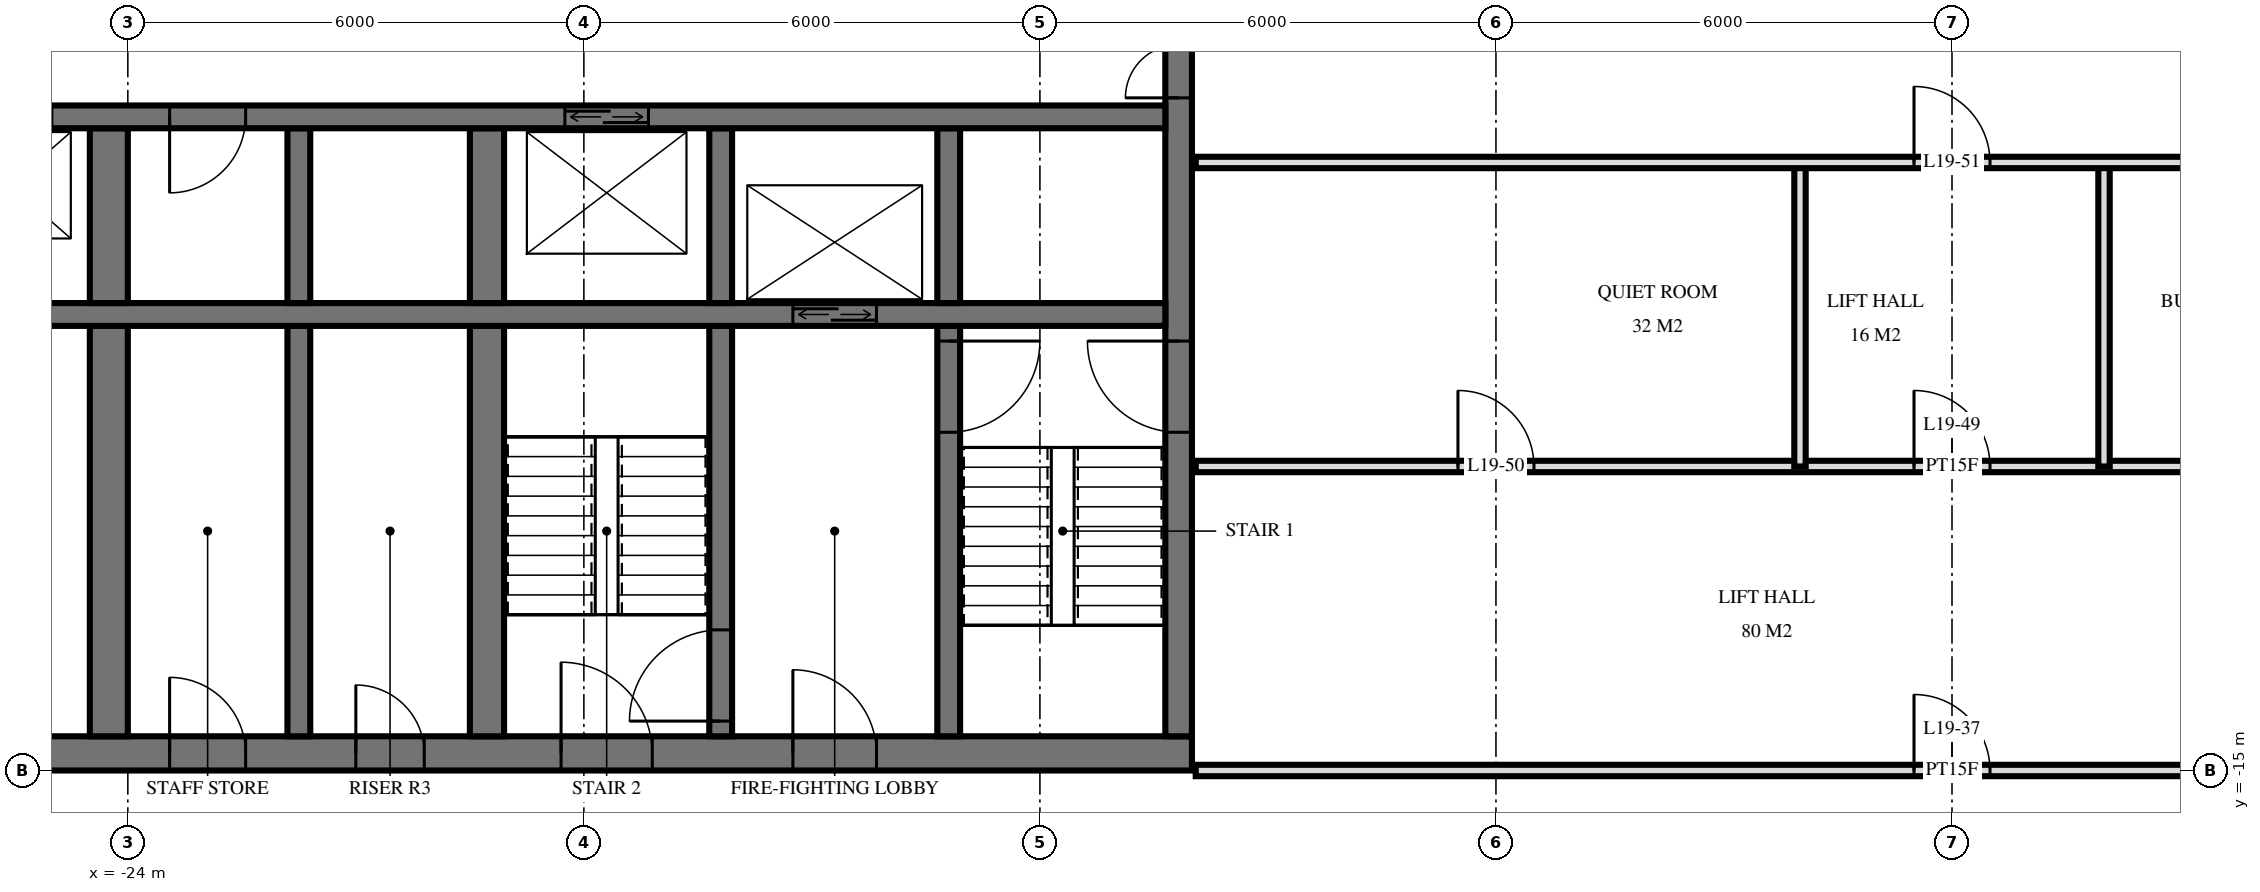
"""IFC4 building model, lengths in metres.
Left out: names, types, materials, properties, quantities, classifications, styles, units other than length and angle.
Written with IfcOpenShell. Run it as: python <this file> out.ifc"""

import sys

from ifc_helpers import new_model, si_unit, direction, frame, frame_2d, origin, place, context, subcontext, project, spatial, rectangle, extrude, element, fill, save


model = new_model("IFC4")
c1 = context("Model", 3, precision=1e-05, world=origin(), true_north=direction((0.0, 1.0)))
c2 = subcontext(c1, "Body", "Model", "MODEL_VIEW")
j1 = project(units=[si_unit("LENGTHUNIT", "METRE"), si_unit("PLANEANGLEUNIT", "RADIAN")], contexts=[c1])
p1 = place(None, origin())
s1 = spatial("IfcSite", under=j1, at=p1, CompositionType="ELEMENT")
p2 = place(p1, origin())
s2 = spatial("IfcBuilding", under=s1, at=p2, CompositionType="ELEMENT")
p3 = place(p2, frame((0.0, 0.0, 78.0)))
s3 = spatial("IfcBuildingStorey", under=s2, at=p3, CompositionType="ELEMENT", Elevation=78.0)
p4 = place(p3, frame((-29.5, -14.775, 0.0), z_axis=(0.0, 0.0, 1.0), x_axis=(1.0, 0.0, 0.0)))
e1 = element("IfcWall", 1, at=p4, inside=s3, PredefinedType="SHEAR", context=c2, shape_type="SweptSolid", body=[
    extrude(rectangle(XDim=19.5, YDim=0.45, at=frame_2d((9.75, 0.0))), origin(), (0.0, 0.0, 1.0), 3.6),
])
p5 = place(p4, frame((11.2, 0.0, 0.0)))
e2 = element("IfcOpeningElement", 2, at=p5, cuts=e1, PredefinedType="OPENING", context=c2, shape_type="SweptSolid", body=[
    extrude(rectangle(XDim=1.2, YDim=2.1, at=frame_2d((0.6, 1.05))), frame((0.0, 0.235, 0.0), z_axis=(0.0, -1.0, 0.0), x_axis=(1.0, 0.0, 0.0)), (0.0, 0.0, 1.0), 0.47),
])
p6 = place(p4, frame((14.25, 0.0, 0.0)))
e3 = element("IfcOpeningElement", 3, at=p6, cuts=e1, PredefinedType="OPENING", context=c2, shape_type="SweptSolid", body=[
    extrude(rectangle(XDim=1.1, YDim=2.1, at=frame_2d((0.55, 1.05))), frame((0.0, 0.235, 0.0), z_axis=(0.0, -1.0, 0.0), x_axis=(1.0, 0.0, 0.0)), (0.0, 0.0, 1.0), 0.47),
])
p7 = place(p4, frame((8.5, 0.0, 0.0)))
e4 = element("IfcOpeningElement", 4, at=p7, cuts=e1, PredefinedType="OPENING", context=c2, shape_type="SweptSolid", body=[
    extrude(rectangle(XDim=0.9, YDim=2.1, at=frame_2d((0.45, 1.05))), frame((0.0, 0.235, 0.0), z_axis=(0.0, -1.0, 0.0), x_axis=(1.0, 0.0, 0.0)), (0.0, 0.0, 1.0), 0.47),
])
p8 = place(p4, frame((6.05, 0.0, 0.0)))
e5 = element("IfcOpeningElement", 5, at=p8, cuts=e1, PredefinedType="OPENING", context=c2, shape_type="SweptSolid", body=[
    extrude(rectangle(XDim=1.0, YDim=2.1, at=frame_2d((0.5, 1.05))), frame((0.0, 0.235, 0.0), z_axis=(0.0, -1.0, 0.0), x_axis=(1.0, 0.0, 0.0)), (0.0, 0.0, 1.0), 0.47),
])
p9 = place(p4, frame((2.988, 0.0, 0.0)))
e6 = element("IfcOpeningElement", 6, at=p9, cuts=e1, PredefinedType="OPENING", context=c2, shape_type="SweptSolid", body=[
    extrude(rectangle(XDim=1.0, YDim=2.1, at=frame_2d((0.5, 1.05))), frame((0.0, 0.235, 0.0), z_axis=(0.0, -1.0, 0.0), x_axis=(1.0, 0.0, 0.0)), (0.0, 0.0, 1.0), 0.47),
])
p10 = place(p4, frame((0.663, 0.0, 0.0)))
e7 = element("IfcOpeningElement", 7, at=p10, cuts=e1, PredefinedType="OPENING", context=c2, shape_type="SweptSolid", body=[
    extrude(rectangle(XDim=1.0, YDim=2.1, at=frame_2d((0.5, 1.05))), frame((0.0, 0.235, 0.0), z_axis=(0.0, -1.0, 0.0), x_axis=(1.0, 0.0, 0.0)), (0.0, 0.0, 1.0), 0.47),
])
p11 = place(p3, frame((-10.175, -14.55, 0.0), z_axis=(0.0, 0.0, 1.0), x_axis=(0.0, 1.0, 0.0)))
e8 = element("IfcWall", 8, at=p11, inside=s3, PredefinedType="SHEAR", context=c2, shape_type="SweptSolid", body=[
    extrude(rectangle(XDim=14.1, YDim=0.35, at=frame_2d((7.05, 0.0))), origin(), (0.0, 0.0, 1.0), 3.6),
])
p12 = place(p11, frame((8.4, 0.0, 0.0)))
e9 = element("IfcOpeningElement", 9, at=p12, cuts=e8, PredefinedType="OPENING", context=c2, shape_type="SweptSolid", body=[
    extrude(rectangle(XDim=1.4, YDim=2.4, at=frame_2d((0.7, 1.2))), frame((0.0, 0.185, 0.0), z_axis=(0.0, -1.0, 0.0), x_axis=(1.0, 0.0, 0.0)), (0.0, 0.0, 1.0), 0.37),
])
p13 = place(p11, frame((10.0, 0.0, 0.0)))
e10 = element("IfcOpeningElement", 10, at=p13, cuts=e8, PredefinedType="OPENING", context=c2, shape_type="SweptSolid", body=[
    extrude(rectangle(XDim=1.4, YDim=2.4, at=frame_2d((0.7, 1.2))), frame((0.0, 0.185, 0.0), z_axis=(0.0, -1.0, 0.0), x_axis=(1.0, 0.0, 0.0)), (0.0, 0.0, 1.0), 0.37),
])
p14 = place(p11, frame((4.0, 0.0, 0.0)))
e11 = element("IfcOpeningElement", 11, at=p14, cuts=e8, PredefinedType="OPENING", context=c2, shape_type="SweptSolid", body=[
    extrude(rectangle(XDim=1.2, YDim=2.1, at=frame_2d((0.6, 1.05))), frame((0.0, 0.185, 0.0), z_axis=(0.0, -1.0, 0.0), x_axis=(1.0, 0.0, 0.0)), (0.0, 0.0, 1.0), 0.37),
])
p15 = place(p3, frame((-29.05, -6.4, 0.0), z_axis=(0.0, 0.0, 1.0), x_axis=(1.0, 0.0, 0.0)))
e12 = element("IfcWall", 12, at=p15, inside=s3, PredefinedType="SHEAR", context=c2, shape_type="SweptSolid", body=[
    extrude(rectangle(XDim=18.7, YDim=0.3, at=frame_2d((9.35, 0.0))), origin(), (0.0, 0.0, 1.0), 3.6),
])
p16 = place(p15, frame((2.95, 0.0, 0.0)))
e13 = element("IfcOpeningElement", 13, at=p16, cuts=e12, PredefinedType="OPENING", context=c2, shape_type="SweptSolid", body=[
    extrude(rectangle(XDim=1.1, YDim=2.1, at=frame_2d((0.55, 1.05))), frame((0.0, 0.16, 0.0), z_axis=(0.0, -1.0, 0.0), x_axis=(1.0, 0.0, 0.0)), (0.0, 0.0, 1.0), 0.32),
])
p17 = place(p15, frame((0.55, 0.0, 0.0)))
e14 = element("IfcOpeningElement", 14, at=p17, cuts=e12, PredefinedType="OPENING", context=c2, shape_type="SweptSolid", body=[
    extrude(rectangle(XDim=1.1, YDim=2.1, at=frame_2d((0.55, 1.05))), frame((0.0, 0.16, 0.0), z_axis=(0.0, -1.0, 0.0), x_axis=(1.0, 0.0, 0.0)), (0.0, 0.0, 1.0), 0.32),
])
p18 = place(p15, frame((10.8, 0.0, 0.0)))
e15 = element("IfcOpeningElement", 15, at=p18, cuts=e12, PredefinedType="OPENING", context=c2, shape_type="SweptSolid", body=[
    extrude(rectangle(XDim=1.1, YDim=2.1, at=frame_2d((0.55, 1.05))), frame((0.0, 0.16, 0.0), z_axis=(0.0, -1.0, 0.0), x_axis=(1.0, 0.0, 0.0)), (0.0, 0.0, 1.0), 0.32),
])
p19 = place(p15, frame((5.6, 0.0, 0.0)))
e16 = element("IfcOpeningElement", 16, at=p19, cuts=e12, PredefinedType="OPENING", context=c2, shape_type="SweptSolid", body=[
    extrude(rectangle(XDim=1.0, YDim=2.1, at=frame_2d((0.5, 1.05))), frame((0.0, 0.16, 0.0), z_axis=(0.0, -1.0, 0.0), x_axis=(1.0, 0.0, 0.0)), (0.0, 0.0, 1.0), 0.32),
])
p20 = place(p3, frame((-29.05, -9.0, 0.0), z_axis=(0.0, 0.0, 1.0), x_axis=(1.0, 0.0, 0.0)))
e17 = element("IfcWall", 17, at=p20, inside=s3, PredefinedType="SHEAR", context=c2, shape_type="SweptSolid", body=[
    extrude(rectangle(XDim=18.7, YDim=0.3, at=frame_2d((9.35, 0.0))), origin(), (0.0, 0.0, 1.0), 3.6),
])
p21 = place(p20, frame((13.8, 0.0, 0.0)))
e18 = element("IfcOpeningElement", 18, at=p21, cuts=e17, PredefinedType="OPENING", context=c2, shape_type="SweptSolid", body=[
    extrude(rectangle(XDim=1.1, YDim=2.1, at=frame_2d((0.55, 1.05))), frame((0.0, 0.16, 0.0), z_axis=(0.0, -1.0, 0.0), x_axis=(1.0, 0.0, 0.0)), (0.0, 0.0, 1.0), 0.32),
])
p22 = place(p3, frame((-13.2, -8.85, 0.0), z_axis=(0.0, 0.0, 1.0), x_axis=(0.0, 1.0, 0.0)))
e19 = element("IfcWall", 19, at=p22, inside=s3, PredefinedType="SHEAR", context=c2, shape_type="SweptSolid", body=[
    extrude(rectangle(XDim=2.3, YDim=0.3, at=frame_2d((1.15, 0.0))), origin(), (0.0, 0.0, 1.0), 3.6),
])
p23 = place(p3, frame((-13.2, -14.55, 0.0), z_axis=(0.0, 0.0, 1.0), x_axis=(0.0, 1.0, 0.0)))
e20 = element("IfcWall", 20, at=p23, inside=s3, PredefinedType="SHEAR", context=c2, shape_type="SweptSolid", body=[
    extrude(rectangle(XDim=5.4, YDim=0.3, at=frame_2d((2.7, 0.0))), origin(), (0.0, 0.0, 1.0), 3.6),
])
p24 = place(p23, frame((4.0, 0.0, 0.0)))
e21 = element("IfcOpeningElement", 21, at=p24, cuts=e20, PredefinedType="OPENING", context=c2, shape_type="SweptSolid", body=[
    extrude(rectangle(XDim=1.2, YDim=2.1, at=frame_2d((0.6, 1.05))), frame((0.0, 0.16, 0.0), z_axis=(0.0, -1.0, 0.0), x_axis=(1.0, 0.0, 0.0)), (0.0, 0.0, 1.0), 0.32),
])
p25 = place(p3, frame((-16.2, -8.85, 0.0), z_axis=(0.0, 0.0, 1.0), x_axis=(0.0, 1.0, 0.0)))
e22 = element("IfcWall", 22, at=p25, inside=s3, PredefinedType="SHEAR", context=c2, shape_type="SweptSolid", body=[
    extrude(rectangle(XDim=2.3, YDim=0.3, at=frame_2d((1.15, 0.0))), origin(), (0.0, 0.0, 1.0), 3.6),
])
p26 = place(p3, frame((-16.2, -14.55, 0.0), z_axis=(0.0, 0.0, 1.0), x_axis=(0.0, 1.0, 0.0)))
e23 = element("IfcWall", 23, at=p26, inside=s3, PredefinedType="SHEAR", context=c2, shape_type="SweptSolid", body=[
    extrude(rectangle(XDim=5.4, YDim=0.3, at=frame_2d((2.7, 0.0))), origin(), (0.0, 0.0, 1.0), 3.6),
])
p27 = place(p26, frame((0.2, 0.0, 0.0)))
e24 = element("IfcOpeningElement", 24, at=p27, cuts=e23, PredefinedType="OPENING", context=c2, shape_type="SweptSolid", body=[
    extrude(rectangle(XDim=1.2, YDim=2.1, at=frame_2d((0.6, 1.05))), frame((0.0, 0.16, 0.0), z_axis=(0.0, -1.0, 0.0), x_axis=(1.0, 0.0, 0.0)), (0.0, 0.0, 1.0), 0.32),
])
p28 = place(p3, frame((-19.275, -8.85, 0.0), z_axis=(0.0, 0.0, 1.0), x_axis=(0.0, 1.0, 0.0)))
e25 = element("IfcWall", 25, at=p28, inside=s3, PredefinedType="SHEAR", context=c2, shape_type="SweptSolid", body=[
    extrude(rectangle(XDim=2.3, YDim=0.45, at=frame_2d((1.15, 0.0))), origin(), (0.0, 0.0, 1.0), 3.6),
])
p29 = place(p3, frame((-19.275, -14.55, 0.0), z_axis=(0.0, 0.0, 1.0), x_axis=(0.0, 1.0, 0.0)))
e26 = element("IfcWall", 26, at=p29, inside=s3, PredefinedType="SHEAR", context=c2, shape_type="SweptSolid", body=[
    extrude(rectangle(XDim=5.4, YDim=0.45, at=frame_2d((2.7, 0.0))), origin(), (0.0, 0.0, 1.0), 3.6),
])
p30 = place(p3, frame((-21.75, -8.85, 0.0), z_axis=(0.0, 0.0, 1.0), x_axis=(0.0, 1.0, 0.0)))
e27 = element("IfcWall", 27, at=p30, inside=s3, PredefinedType="SHEAR", context=c2, shape_type="SweptSolid", body=[
    extrude(rectangle(XDim=2.3, YDim=0.3, at=frame_2d((1.15, 0.0))), origin(), (0.0, 0.0, 1.0), 3.6),
])
p31 = place(p3, frame((-21.75, -14.55, 0.0), z_axis=(0.0, 0.0, 1.0), x_axis=(0.0, 1.0, 0.0)))
e28 = element("IfcWall", 28, at=p31, inside=s3, PredefinedType="SHEAR", context=c2, shape_type="SweptSolid", body=[
    extrude(rectangle(XDim=5.4, YDim=0.3, at=frame_2d((2.7, 0.0))), origin(), (0.0, 0.0, 1.0), 3.6),
])
p32 = place(p3, frame((-24.25, -8.85, 0.0), z_axis=(0.0, 0.0, 1.0), x_axis=(0.0, 1.0, 0.0)))
e29 = element("IfcWall", 29, at=p32, inside=s3, PredefinedType="SHEAR", context=c2, shape_type="SweptSolid", body=[
    extrude(rectangle(XDim=2.3, YDim=0.5, at=frame_2d((1.15, 0.0))), origin(), (0.0, 0.0, 1.0), 3.6),
])
p33 = place(p3, frame((-24.25, -14.55, 0.0), z_axis=(0.0, 0.0, 1.0), x_axis=(0.0, 1.0, 0.0)))
e30 = element("IfcWall", 30, at=p33, inside=s3, PredefinedType="SHEAR", context=c2, shape_type="SweptSolid", body=[
    extrude(rectangle(XDim=5.4, YDim=0.5, at=frame_2d((2.7, 0.0))), origin(), (0.0, 0.0, 1.0), 3.6),
])
for number, where, z_axis, x_axis in (
    (31, (2.0, -11.0, 0.0), (0.0, 0.0, 1.0), (0.0, 1.0, 0.0)),
    (32, (-2.0, -11.0, 0.0), (0.0, 0.0, 1.0), (0.0, 1.0, 0.0)),
):
    element("IfcWall", number, at=place(p3, frame(where, z_axis=z_axis, x_axis=x_axis)), inside=s3, PredefinedType="PARTITIONING", context=c2, shape_type="SweptSolid", body=[
        extrude(rectangle(XDim=4.0, YDim=0.15, at=frame_2d((2.0, 0.0))), origin(), (0.0, 0.0, 1.0), 3.32),
    ])
p34 = place(p3, frame((-9.95, -15.0, 0.0), z_axis=(0.0, 0.0, 1.0), x_axis=(1.0, 0.0, 0.0)))
e33 = element("IfcWall", 33, at=p34, inside=s3, PredefinedType="PARTITIONING", context=c2, shape_type="SweptSolid", body=[
    extrude(rectangle(XDim=19.9, YDim=0.15, at=frame_2d((9.95, 0.0))), origin(), (0.0, 0.0, 1.0), 2.684),
])
p35 = place(p34, frame((9.45, 0.0, 0.0)))
e34 = element("IfcOpeningElement", 34, at=p35, cuts=e33, PredefinedType="OPENING", context=c2, shape_type="SweptSolid", body=[
    extrude(rectangle(XDim=1.0, YDim=2.1, at=frame_2d((0.5, 1.05))), frame((0.0, 0.085, 0.0), z_axis=(0.0, -1.0, 0.0), x_axis=(1.0, 0.0, 0.0)), (0.0, 0.0, 1.0), 0.17),
])
p36 = place(p3, frame((-9.95, -11.0, 0.0), z_axis=(0.0, 0.0, 1.0), x_axis=(1.0, 0.0, 0.0)))
e35 = element("IfcWall", 35, at=p36, inside=s3, PredefinedType="PARTITIONING", context=c2, shape_type="SweptSolid", body=[
    extrude(rectangle(XDim=19.9, YDim=0.15, at=frame_2d((9.95, 0.0))), origin(), (0.0, 0.0, 1.0), 3.32),
])
p37 = place(p36, frame((9.45, 0.0, 0.0)))
e36 = element("IfcOpeningElement", 36, at=p37, cuts=e35, PredefinedType="OPENING", context=c2, shape_type="SweptSolid", body=[
    extrude(rectangle(XDim=1.0, YDim=2.1, at=frame_2d((0.5, 1.05))), frame((0.0, 0.085, 0.0), z_axis=(0.0, -1.0, 0.0), x_axis=(1.0, 0.0, 0.0)), (0.0, 0.0, 1.0), 0.17),
])
p38 = place(p36, frame((3.45, 0.0, 0.0)))
e37 = element("IfcOpeningElement", 37, at=p38, cuts=e35, PredefinedType="OPENING", context=c2, shape_type="SweptSolid", body=[
    extrude(rectangle(XDim=1.0, YDim=2.1, at=frame_2d((0.5, 1.05))), frame((0.0, 0.085, 0.0), z_axis=(0.0, -1.0, 0.0), x_axis=(1.0, 0.0, 0.0)), (0.0, 0.0, 1.0), 0.17),
])
p39 = place(p3, frame((-9.95, -7.0, 0.0), z_axis=(0.0, 0.0, 1.0), x_axis=(1.0, 0.0, 0.0)))
e38 = element("IfcWall", 38, at=p39, inside=s3, PredefinedType="PARTITIONING", context=c2, shape_type="SweptSolid", body=[
    extrude(rectangle(XDim=19.9, YDim=0.15, at=frame_2d((9.95, 0.0))), origin(), (0.0, 0.0, 1.0), 3.32),
])
p40 = place(p39, frame((9.45, 0.0, 0.0)))
e39 = element("IfcOpeningElement", 39, at=p40, cuts=e38, PredefinedType="OPENING", context=c2, shape_type="SweptSolid", body=[
    extrude(rectangle(XDim=1.0, YDim=2.1, at=frame_2d((0.5, 1.05))), frame((0.0, 0.085, 0.0), z_axis=(0.0, -1.0, 0.0), x_axis=(1.0, 0.0, 0.0)), (0.0, 0.0, 1.0), 0.17),
])
p41 = place(p39, frame((15.45, 0.0, 0.0)))
e40 = element("IfcOpeningElement", 40, at=p41, cuts=e38, PredefinedType="OPENING", context=c2, shape_type="SweptSolid", body=[
    extrude(rectangle(XDim=1.0, YDim=2.1, at=frame_2d((0.5, 1.05))), frame((0.0, 0.085, 0.0), z_axis=(0.0, -1.0, 0.0), x_axis=(1.0, 0.0, 0.0)), (0.0, 0.0, 1.0), 0.17),
])
p42 = place(p21, origin())
e41 = element("IfcDoor", 41, at=p42, inside=s3, OperationType="DOUBLE_DOOR_SLIDING", PredefinedType="USERDEFINED", context=c2, shape_type="SweptSolid", body=[
    extrude(rectangle(XDim=1.1, YDim=2.1, at=frame_2d((0.55, 1.05))), frame((0.0, 0.025, 0.0), z_axis=(0.0, -1.0, 0.0), x_axis=(1.0, 0.0, 0.0)), (0.0, 0.0, 1.0), 0.05),
])
fill(e18, e41)
p43 = place(p18, origin())
e42 = element("IfcDoor", 42, at=p43, inside=s3, OperationType="DOUBLE_DOOR_SLIDING", PredefinedType="USERDEFINED", context=c2, shape_type="SweptSolid", body=[
    extrude(rectangle(XDim=1.1, YDim=2.1, at=frame_2d((0.55, 1.05))), frame((0.0, 0.025, 0.0), z_axis=(0.0, -1.0, 0.0), x_axis=(1.0, 0.0, 0.0)), (0.0, 0.0, 1.0), 0.05),
])
fill(e15, e42)
p44 = place(p12, origin())
e43 = element("IfcDoor", 43, at=p44, inside=s3, OperationType="DOUBLE_DOOR_SINGLE_SWING", PredefinedType="DOOR", context=c2, shape_type="SweptSolid", body=[
    extrude(rectangle(XDim=1.4, YDim=2.4, at=frame_2d((0.7, 1.2))), frame((0.0, 0.025, 0.0), z_axis=(0.0, -1.0, 0.0), x_axis=(1.0, 0.0, 0.0)), (0.0, 0.0, 1.0), 0.05),
])
fill(e9, e43)
p45 = place(p14, origin())
e44 = element("IfcDoor", 44, at=p45, inside=s3, OperationType="SINGLE_SWING_LEFT", PredefinedType="DOOR", context=c2, shape_type="SweptSolid", body=[
    extrude(rectangle(XDim=1.2, YDim=2.1, at=frame_2d((0.6, 1.05))), frame((0.0, 0.025, 0.0), z_axis=(0.0, -1.0, 0.0), x_axis=(1.0, 0.0, 0.0)), (0.0, 0.0, 1.0), 0.05),
])
fill(e11, e44)
p46 = place(p5, origin())
e45 = element("IfcDoor", 45, at=p46, inside=s3, OperationType="SINGLE_SWING_RIGHT", PredefinedType="DOOR", context=c2, shape_type="SweptSolid", body=[
    extrude(rectangle(XDim=1.2, YDim=2.1, at=frame_2d((0.6, 1.05))), frame((0.0, 0.025, 0.0), z_axis=(0.0, -1.0, 0.0), x_axis=(1.0, 0.0, 0.0)), (0.0, 0.0, 1.0), 0.05),
])
fill(e2, e45)
p47 = place(p6, origin())
e46 = element("IfcDoor", 46, at=p47, inside=s3, OperationType="SINGLE_SWING_RIGHT", PredefinedType="DOOR", context=c2, shape_type="SweptSolid", body=[
    extrude(rectangle(XDim=1.1, YDim=2.1, at=frame_2d((0.55, 1.05))), frame((0.0, 0.025, 0.0), z_axis=(0.0, -1.0, 0.0), x_axis=(1.0, 0.0, 0.0)), (0.0, 0.0, 1.0), 0.05),
])
fill(e3, e46)
p48 = place(p7, origin())
e47 = element("IfcDoor", 47, at=p48, inside=s3, OperationType="SINGLE_SWING_RIGHT", PredefinedType="DOOR", context=c2, shape_type="SweptSolid", body=[
    extrude(rectangle(XDim=0.9, YDim=2.1, at=frame_2d((0.45, 1.05))), frame((0.0, 0.025, 0.0), z_axis=(0.0, -1.0, 0.0), x_axis=(1.0, 0.0, 0.0)), (0.0, 0.0, 1.0), 0.05),
])
fill(e4, e47)
p49 = place(p8, origin())
e48 = element("IfcDoor", 48, at=p49, inside=s3, OperationType="SINGLE_SWING_RIGHT", PredefinedType="DOOR", context=c2, shape_type="SweptSolid", body=[
    extrude(rectangle(XDim=1.0, YDim=2.1, at=frame_2d((0.5, 1.05))), frame((0.0, 0.025, 0.0), z_axis=(0.0, -1.0, 0.0), x_axis=(1.0, 0.0, 0.0)), (0.0, 0.0, 1.0), 0.05),
])
fill(e5, e48)
p50 = place(p19, frame((0.5, 0.0, 0.0), z_axis=(0.0, 0.0, 1.0), x_axis=(-1.0, 0.0, 0.0)))
e49 = element("IfcDoor", 49, at=p50, inside=s3, OperationType="SINGLE_SWING_LEFT", PredefinedType="DOOR", context=c2, shape_type="SweptSolid", body=[
    extrude(rectangle(XDim=1.0, YDim=2.1, at=frame_2d((0.0, 1.05))), frame((0.0, -0.025, 0.0), z_axis=(0.0, 1.0, 0.0), x_axis=(-1.0, 0.0, 0.0)), (0.0, 0.0, 1.0), 0.05),
])
fill(e16, e49)
p51 = place(p24, frame((0.6, 0.0, 0.0), z_axis=(0.0, 0.0, 1.0), x_axis=(-1.0, 0.0, 0.0)))
e50 = element("IfcDoor", 50, at=p51, inside=s3, OperationType="SINGLE_SWING_RIGHT", PredefinedType="DOOR", context=c2, shape_type="SweptSolid", body=[
    extrude(rectangle(XDim=1.2, YDim=2.1, at=frame_2d((0.0, 1.05))), frame((0.0, -0.025, 0.0), z_axis=(0.0, 1.0, 0.0), x_axis=(-1.0, 0.0, 0.0)), (0.0, 0.0, 1.0), 0.05),
])
fill(e21, e50)
p52 = place(p27, origin())
e51 = element("IfcDoor", 51, at=p52, inside=s3, OperationType="SINGLE_SWING_RIGHT", PredefinedType="DOOR", context=c2, shape_type="SweptSolid", body=[
    extrude(rectangle(XDim=1.2, YDim=2.1, at=frame_2d((0.6, 1.05))), frame((0.0, 0.025, 0.0), z_axis=(0.0, -1.0, 0.0), x_axis=(1.0, 0.0, 0.0)), (0.0, 0.0, 1.0), 0.05),
])
fill(e24, e51)
p53 = place(p35, origin())
e52 = element("IfcDoor", 52, at=p53, inside=s3, OperationType="SINGLE_SWING_RIGHT", PredefinedType="DOOR", context=c2, shape_type="SweptSolid", body=[
    extrude(rectangle(XDim=1.0, YDim=2.1, at=frame_2d((0.5, 1.05))), frame((0.0, 0.025, 0.0), z_axis=(0.0, -1.0, 0.0), x_axis=(1.0, 0.0, 0.0)), (0.0, 0.0, 1.0), 0.05),
])
fill(e34, e52)
p54 = place(p37, origin())
e53 = element("IfcDoor", 53, at=p54, inside=s3, OperationType="SINGLE_SWING_RIGHT", PredefinedType="DOOR", context=c2, shape_type="SweptSolid", body=[
    extrude(rectangle(XDim=1.0, YDim=2.1, at=frame_2d((0.5, 1.05))), frame((0.0, 0.025, 0.0), z_axis=(0.0, -1.0, 0.0), x_axis=(1.0, 0.0, 0.0)), (0.0, 0.0, 1.0), 0.05),
])
fill(e36, e53)
p55 = place(p38, origin())
e54 = element("IfcDoor", 54, at=p55, inside=s3, OperationType="SINGLE_SWING_RIGHT", PredefinedType="DOOR", context=c2, shape_type="SweptSolid", body=[
    extrude(rectangle(XDim=1.0, YDim=2.1, at=frame_2d((0.5, 1.05))), frame((0.0, 0.025, 0.0), z_axis=(0.0, -1.0, 0.0), x_axis=(1.0, 0.0, 0.0)), (0.0, 0.0, 1.0), 0.05),
])
fill(e37, e54)
p56 = place(p40, origin())
e55 = element("IfcDoor", 55, at=p56, inside=s3, OperationType="SINGLE_SWING_RIGHT", PredefinedType="DOOR", context=c2, shape_type="SweptSolid", body=[
    extrude(rectangle(XDim=1.0, YDim=2.1, at=frame_2d((0.5, 1.05))), frame((0.0, 0.025, 0.0), z_axis=(0.0, -1.0, 0.0), x_axis=(1.0, 0.0, 0.0)), (0.0, 0.0, 1.0), 0.05),
])
fill(e39, e55)
save(model, sys.argv[1])
